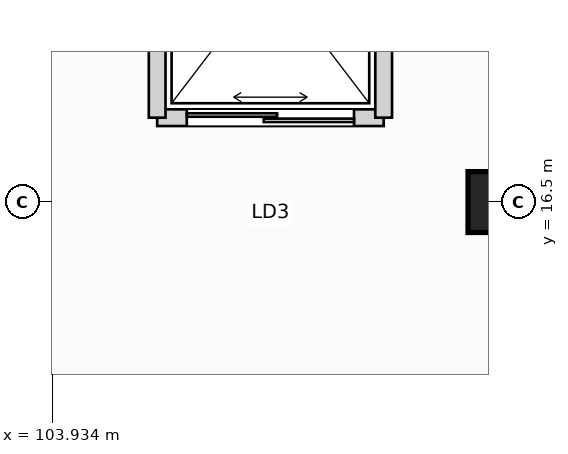
"""IFC4 building model, lengths in metres.
Left out: names, types, materials, properties, quantities, classifications, styles, units other than length and angle.
Written with IfcOpenShell. Run it as: python <this file> out.ifc"""

import sys

from ifc_helpers import new_model, si_unit, direction, frame, frame_2d, origin, origin_2d, place, context, subcontext, project, spatial, rectangle, extrude, element, fill, save


model = new_model("IFC4")
c1 = context("Model", 3, precision=1e-05, world=origin(), true_north=direction((0.0, 1.0)))
c2 = subcontext(c1, "Body", "Model", "MODEL_VIEW")
j1 = project(units=[si_unit("LENGTHUNIT", "METRE"), si_unit("PLANEANGLEUNIT", "RADIAN")], contexts=[c1])
p1 = place(None, origin())
s1 = spatial("IfcSite", under=j1, at=p1, CompositionType="ELEMENT")
p2 = place(p1, origin())
s2 = spatial("IfcBuilding", under=s1, at=p2, CompositionType="ELEMENT")
p3 = place(p2, frame((0.0, 0.0, -5.4)))
s3 = spatial("IfcBuildingStorey", under=s2, at=p3, CompositionType="ELEMENT", Elevation=-5.4)
p4 = place(p3, frame((109.8, 16.5, 0.0), z_axis=(0.0, 0.0, 1.0), x_axis=(1.0, 0.0, 0.0)))
e1 = element("IfcColumn", 1, at=p4, inside=s3, PredefinedType="COLUMN", context=c2, shape_type="SweptSolid", body=[
    extrude(rectangle(XDim=0.8, YDim=0.8, at=origin_2d()), origin(), (0.0, 0.0, 1.0), 5.4),
])
p5 = place(p3, frame((105.31, 17.61, 0.0), z_axis=(0.0, 0.0, 1.0), x_axis=(1.0, 0.0, 0.0)))
e2 = element("IfcWall", 2, at=p5, inside=s3, PredefinedType="PARTITIONING", context=c2, shape_type="SweptSolid", body=[
    extrude(rectangle(XDim=2.98, YDim=0.22, at=frame_2d((1.49, 0.0))), origin(), (0.0, 0.0, 1.0), 5.045),
])
p6 = place(p5, frame((0.39, 0.0, 0.0)))
e3 = element("IfcOpeningElement", 3, at=p6, cuts=e2, PredefinedType="OPENING", context=c2, shape_type="SweptSolid", body=[
    extrude(rectangle(XDim=2.2, YDim=2.5, at=frame_2d((1.1, 1.25))), frame((0.0, 0.12, 0.0), z_axis=(0.0, -1.0, 0.0), x_axis=(1.0, 0.0, 0.0)), (0.0, 0.0, 1.0), 0.24),
])
for number, where, z_axis, x_axis in (
    (4, (105.31, 17.61, 0.0), (0.0, 0.0, 1.0), (0.0, 1.0, 0.0)),
    (5, (108.29, 17.61, 0.0), (0.0, 0.0, 1.0), (0.0, 1.0, 0.0)),
):
    element("IfcWall", number, at=place(p3, frame(where, z_axis=z_axis, x_axis=x_axis)), inside=s3, PredefinedType="PARTITIONING", context=c2, shape_type="SweptSolid", body=[
        extrude(rectangle(XDim=3.78, YDim=0.22, at=frame_2d((1.89, 0.0))), origin(), (0.0, 0.0, 1.0), 5.045),
    ])
p7 = place(p6, origin())
e6 = element("IfcDoor", 6, at=p7, inside=s3, OperationType="DOUBLE_DOOR_SLIDING", PredefinedType="DOOR", context=c2, shape_type="SweptSolid", body=[
    extrude(rectangle(XDim=2.2, YDim=2.5, at=frame_2d((1.1, 1.25))), frame((0.0, 0.025, 0.0), z_axis=(0.0, -1.0, 0.0), x_axis=(1.0, 0.0, 0.0)), (0.0, 0.0, 1.0), 0.05),
])
fill(e3, e6)
save(model, sys.argv[1])
